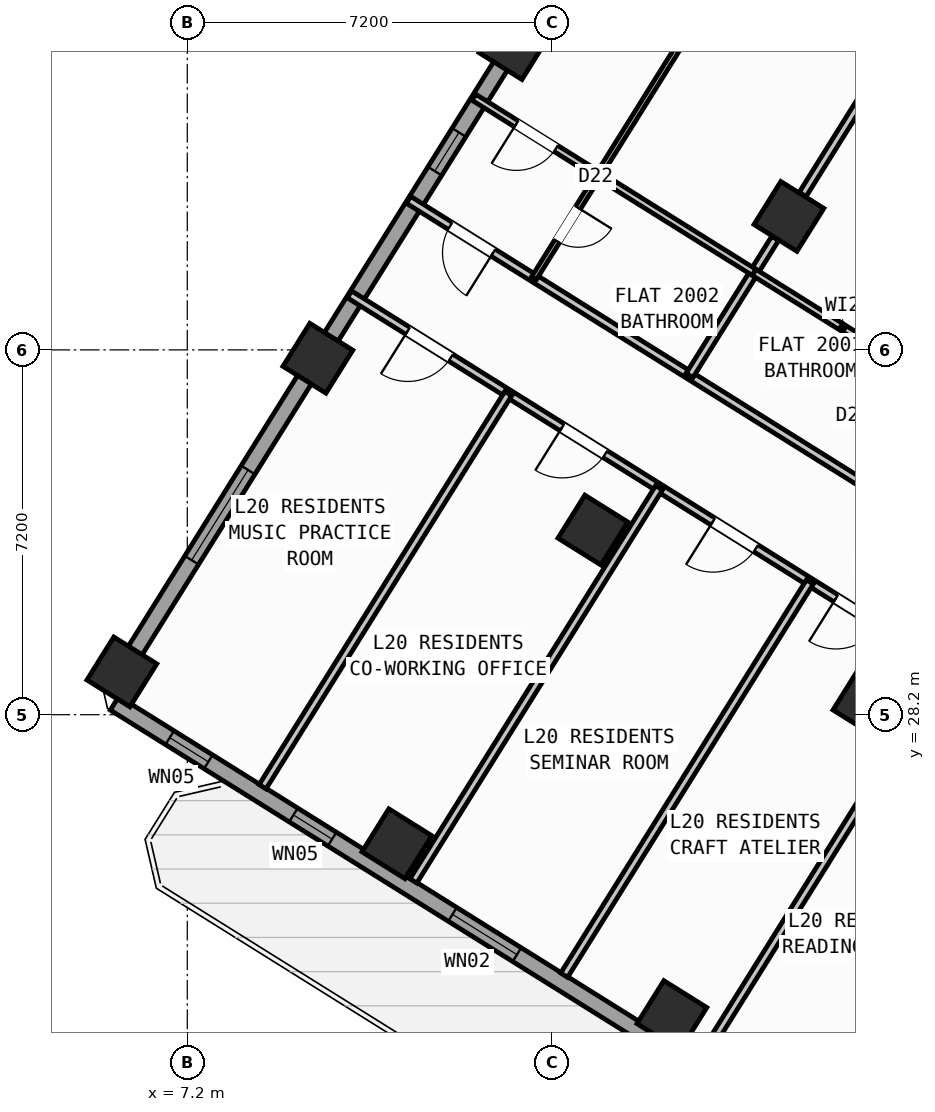
"""IFC4 building model, lengths in metres.
Left out: names, types, materials, properties, quantities, classifications, styles, units other than length and angle.
Written with IfcOpenShell. Run it as: python <this file> out.ifc"""

import sys

from ifc_helpers import new_model, si_unit, direction, frame, frame_2d, origin, origin_2d, place, context, subcontext, project, spatial, rectangle, hollow_rectangle, extrude, source, transform, mapped, element, fill, save


model = new_model("IFC4")
c1 = context("Model", 3, precision=1e-05, world=origin(), true_north=direction((0.0, 1.0)))
c2 = subcontext(c1, "Body", "Model", "MODEL_VIEW")
j1 = project(units=[si_unit("LENGTHUNIT", "METRE"), si_unit("PLANEANGLEUNIT", "RADIAN")], contexts=[c1])
p1 = place(None, origin())
s1 = spatial("IfcSite", under=j1, at=p1, CompositionType="ELEMENT")
p2 = place(p1, origin())
s2 = spatial("IfcBuilding", under=s1, at=p2, CompositionType="ELEMENT")
p3 = place(p2, frame((0.0, 0.0, 81.0)))
s3 = spatial("IfcBuildingStorey", under=s2, at=p3, CompositionType="ELEMENT", Elevation=81.0)
m1 = source(origin(), c2, "Body", "SweptSolid", [
    extrude(hollow_rectangle(XDim=1.0, YDim=1.0, WallThickness=0.04, at=origin_2d()), origin(), (0.0, 0.0, 1.0), 3.6),
])
for number, where, z_axis, x_axis in (
    (1, (20.632, 28.452, 0.0), (0.0, 0.0, 1.0), (-0.848, 0.53, 0.0)),
    (2, (16.764, 22.261, 0.0), (0.0, 0.0, 1.0), (-0.848, 0.53, 0.0)),
    (3, (19.073, 38.034, 0.0), (0.0, 0.0, 1.0), (-0.848, 0.53, 0.0)),
    (4, (15.205, 31.844, 0.0), (0.0, 0.0, 1.0), (-0.848, 0.53, 0.0)),
    (5, (11.336, 25.653, 0.0), (0.0, 0.0, 1.0), (-0.848, 0.53, 0.0)),
    (6, (13.646, 41.426, 0.0), (0.0, 0.0, 1.0), (-0.848, 0.53, 0.0)),
    (7, (9.777, 35.235, 0.0), (0.0, 0.0, 1.0), (-0.848, 0.53, 0.0)),
    (8, (5.909, 29.044, 0.0), (0.0, 0.0, 1.0), (-0.848, 0.53, 0.0)),
):
    element("IfcColumn", number, at=place(p3, frame(where, z_axis=z_axis, x_axis=x_axis)), inside=s3, PredefinedType="COLUMN", context=c2, shape_type="MappedRepresentation", body=[
        mapped(m1, transform((0.0, 0.0, 0.0), scale=1.0)),
    ])
p4 = place(p3, frame((31.76, 12.183, 0.0), z_axis=(0.0, 0.0, 1.0), x_axis=(-0.848047074256, 0.529920899612, 0.0)))
e9 = element("IfcWall", 9, at=p4, inside=s3, PredefinedType="STANDARD", context=c2, shape_type="SweptSolid", body=[
    extrude(rectangle(XDim=30.652, YDim=0.32, at=frame_2d((15.326, 0.0))), origin(), (0.0, 0.0, 1.0), 3.32),
])
p5 = place(p4, frame((14.878, 0.0, 0.0)))
e10 = element("IfcOpeningElement", 10, at=p5, cuts=e9, PredefinedType="OPENING", context=c2, shape_type="SweptSolid", body=[
    extrude(rectangle(XDim=1.2, YDim=2.15, at=frame_2d((0.6, 1.075))), frame((0.0, 0.17, 0.0), z_axis=(0.0, -1.0, 0.0), x_axis=(1.0, 0.0, 0.0)), (0.0, 0.0, 1.0), 0.34),
])
p6 = place(p4, frame((1.99, 0.0, 0.8)))
e11 = element("IfcOpeningElement", 11, at=p6, cuts=e9, PredefinedType="OPENING", context=c2, shape_type="SweptSolid", body=[
    extrude(rectangle(XDim=2.1, YDim=1.55, at=frame_2d((1.05, 0.775))), frame((0.0, 0.17, 0.0), z_axis=(0.0, -1.0, 0.0), x_axis=(1.0, 0.0, 0.0)), (0.0, 0.0, 1.0), 0.34),
])
p7 = place(p4, frame((7.169, 0.0, 0.8)))
e12 = element("IfcOpeningElement", 12, at=p7, cuts=e9, PredefinedType="OPENING", context=c2, shape_type="SweptSolid", body=[
    extrude(rectangle(XDim=2.1, YDim=1.55, at=frame_2d((1.05, 0.775))), frame((0.0, 0.17, 0.0), z_axis=(0.0, -1.0, 0.0), x_axis=(1.0, 0.0, 0.0)), (0.0, 0.0, 1.0), 0.34),
])
p8 = place(p4, frame((21.289, 0.0, 0.85)))
e13 = element("IfcOpeningElement", 13, at=p8, cuts=e9, PredefinedType="OPENING", context=c2, shape_type="SweptSolid", body=[
    extrude(rectangle(XDim=1.5, YDim=1.5, at=frame_2d((0.75, 0.75))), frame((0.0, 0.17, 0.0), z_axis=(0.0, -1.0, 0.0), x_axis=(1.0, 0.0, 0.0)), (0.0, 0.0, 1.0), 0.34),
])
p9 = place(p4, frame((25.59, 0.0, 1.0)))
e14 = element("IfcOpeningElement", 14, at=p9, cuts=e9, PredefinedType="OPENING", context=c2, shape_type="SweptSolid", body=[
    extrude(rectangle(XDim=0.9, YDim=1.25, at=frame_2d((0.45, 0.625))), frame((0.0, 0.17, 0.0), z_axis=(0.0, -1.0, 0.0), x_axis=(1.0, 0.0, 0.0)), (0.0, 0.0, 1.0), 0.34),
])
p10 = place(p4, frame((28.47, 0.0, 1.0)))
e15 = element("IfcOpeningElement", 15, at=p10, cuts=e9, PredefinedType="OPENING", context=c2, shape_type="SweptSolid", body=[
    extrude(rectangle(XDim=0.9, YDim=1.25, at=frame_2d((0.45, 0.625))), frame((0.0, 0.17, 0.0), z_axis=(0.0, -1.0, 0.0), x_axis=(1.0, 0.0, 0.0)), (0.0, 0.0, 1.0), 0.34),
])
p11 = place(p3, frame((5.7, 28.71, 0.0), z_axis=(0.0, 0.0, 1.0), x_axis=(0.529923711467, 0.8480453172, 0.0)))
e16 = element("IfcWall", 16, at=p11, inside=s3, PredefinedType="STANDARD", context=c2, shape_type="SweptSolid", body=[
    extrude(rectangle(XDim=21.587, YDim=0.32, at=frame_2d((10.794, 0.0))), origin(), (0.0, 0.0, 1.0), 2.745),
])
p12 = place(p11, frame((2.994, 0.0, 0.8)))
e17 = element("IfcOpeningElement", 17, at=p12, cuts=e16, PredefinedType="OPENING", context=c2, shape_type="SweptSolid", body=[
    extrude(rectangle(XDim=2.1, YDim=1.55, at=frame_2d((1.05, 0.775))), frame((0.0, 0.17, 0.0), z_axis=(0.0, -1.0, 0.0), x_axis=(1.0, 0.0, 0.0)), (0.0, 0.0, 1.0), 0.34),
])
p13 = place(p11, frame((12.049, 0.0, 1.0)))
e18 = element("IfcOpeningElement", 18, at=p13, cuts=e16, PredefinedType="OPENING", context=c2, shape_type="SweptSolid", body=[
    extrude(rectangle(XDim=0.9, YDim=1.25, at=frame_2d((0.45, 0.625))), frame((0.0, 0.17, 0.0), z_axis=(0.0, -1.0, 0.0), x_axis=(1.0, 0.0, 0.0)), (0.0, 0.0, 1.0), 0.34),
])
p14 = place(p11, frame((17.431, 0.0, 0.85)))
e19 = element("IfcOpeningElement", 19, at=p14, cuts=e16, PredefinedType="OPENING", context=c2, shape_type="SweptSolid", body=[
    extrude(rectangle(XDim=1.5, YDim=1.5, at=frame_2d((0.75, 0.75))), frame((0.0, 0.17, 0.0), z_axis=(0.0, -1.0, 0.0), x_axis=(1.0, 0.0, 0.0)), (0.0, 0.0, 1.0), 0.34),
])
p15 = place(p3, frame((17.424, 47.083, 0.0), z_axis=(0.0, 0.0, 1.0), x_axis=(0.848049927979, -0.529916332693, 0.0)))
e20 = element("IfcWall", 20, at=p15, inside=s3, PredefinedType="STANDARD", context=c2, shape_type="SweptSolid", body=[
    extrude(rectangle(XDim=29.223, YDim=0.32, at=frame_2d((14.612, 0.0))), origin(), (0.0, 0.0, 1.0), 3.32),
])
p16 = place(p15, frame((3.709, 0.0, 0.0)))
e21 = element("IfcOpeningElement", 21, at=p16, cuts=e20, PredefinedType="OPENING", context=c2, shape_type="SweptSolid", body=[
    extrude(rectangle(XDim=1.05, YDim=2.15, at=frame_2d((0.525, 1.075))), frame((0.0, 0.17, 0.0), z_axis=(0.0, -1.0, 0.0), x_axis=(1.0, 0.0, 0.0)), (0.0, 0.0, 1.0), 0.34),
])
p17 = place(p15, frame((0.659, 0.0, 0.95)))
e22 = element("IfcOpeningElement", 22, at=p17, cuts=e20, PredefinedType="OPENING", context=c2, shape_type="SweptSolid", body=[
    extrude(rectangle(XDim=1.2, YDim=1.4, at=frame_2d((0.6, 0.7))), frame((0.0, 0.17, 0.0), z_axis=(0.0, -1.0, 0.0), x_axis=(1.0, 0.0, 0.0)), (0.0, 0.0, 1.0), 0.34),
])
p18 = place(p15, frame((7.369, 0.0, 0.85)))
e23 = element("IfcOpeningElement", 23, at=p18, cuts=e20, PredefinedType="OPENING", context=c2, shape_type="SweptSolid", body=[
    extrude(rectangle(XDim=1.8, YDim=1.5, at=frame_2d((0.9, 0.75))), frame((0.0, 0.17, 0.0), z_axis=(0.0, -1.0, 0.0), x_axis=(1.0, 0.0, 0.0)), (0.0, 0.0, 1.0), 0.34),
])
p19 = place(p15, frame((11.009, 0.0, 1.0)))
e24 = element("IfcOpeningElement", 24, at=p19, cuts=e20, PredefinedType="OPENING", context=c2, shape_type="SweptSolid", body=[
    extrude(rectangle(XDim=0.9, YDim=1.25, at=frame_2d((0.45, 0.625))), frame((0.0, 0.17, 0.0), z_axis=(0.0, -1.0, 0.0), x_axis=(1.0, 0.0, 0.0)), (0.0, 0.0, 1.0), 0.34),
])
p20 = place(p15, frame((13.874, 0.0, 0.95)))
e25 = element("IfcOpeningElement", 25, at=p20, cuts=e20, PredefinedType="OPENING", context=c2, shape_type="SweptSolid", body=[
    extrude(rectangle(XDim=1.2, YDim=1.4, at=frame_2d((0.6, 0.7))), frame((0.0, 0.17, 0.0), z_axis=(0.0, -1.0, 0.0), x_axis=(1.0, 0.0, 0.0)), (0.0, 0.0, 1.0), 0.34),
])
p21 = place(p15, frame((17.254, 0.0, 1.0)))
e26 = element("IfcOpeningElement", 26, at=p21, cuts=e20, PredefinedType="OPENING", context=c2, shape_type="SweptSolid", body=[
    extrude(rectangle(XDim=0.9, YDim=1.25, at=frame_2d((0.45, 0.625))), frame((0.0, 0.17, 0.0), z_axis=(0.0, -1.0, 0.0), x_axis=(1.0, 0.0, 0.0)), (0.0, 0.0, 1.0), 0.34),
])
p22 = place(p15, frame((20.764, 0.0, 0.8)))
e27 = element("IfcOpeningElement", 27, at=p22, cuts=e20, PredefinedType="OPENING", context=c2, shape_type="SweptSolid", body=[
    extrude(rectangle(XDim=2.1, YDim=1.55, at=frame_2d((1.05, 0.775))), frame((0.0, 0.17, 0.0), z_axis=(0.0, -1.0, 0.0), x_axis=(1.0, 0.0, 0.0)), (0.0, 0.0, 1.0), 0.34),
])
p23 = place(p15, frame((25.403, 0.0, 0.8)))
e28 = element("IfcOpeningElement", 28, at=p23, cuts=e20, PredefinedType="OPENING", context=c2, shape_type="SweptSolid", body=[
    extrude(rectangle(XDim=2.1, YDim=1.55, at=frame_2d((1.05, 0.775))), frame((0.0, 0.17, 0.0), z_axis=(0.0, -1.0, 0.0), x_axis=(1.0, 0.0, 0.0)), (0.0, 0.0, 1.0), 0.34),
])
p24 = place(p3, frame((24.588, 27.631, 0.0), z_axis=(0.0, 0.0, 1.0), x_axis=(-0.529914992377, -0.848050765494, 0.0)))
e29 = element("IfcWall", 29, at=p24, inside=s3, PredefinedType="PARTITIONING", context=c2, shape_type="SweptSolid", body=[
    extrude(rectangle(XDim=9.15, YDim=0.16, at=frame_2d((4.575, 0.0))), origin(), (0.0, 0.0, 1.0), 3.31),
])
p25 = place(p3, frame((25.754, 29.497, 0.0), z_axis=(0.0, 0.0, 1.0), x_axis=(-0.848045850158, 0.529922858565, 0.0)))
e30 = element("IfcWall", 30, at=p25, inside=s3, PredefinedType="PARTITIONING", context=c2, shape_type="SweptSolid", body=[
    extrude(rectangle(XDim=16.73, YDim=0.16, at=frame_2d((8.365, 0.0))), origin(), (0.0, 0.0, 1.0), 3.31),
])
p26 = place(p25, frame((2.532, 0.0, 0.0)))
e31 = element("IfcOpeningElement", 31, at=p26, cuts=e30, PredefinedType="OPENING", context=c2, shape_type="SweptSolid", body=[
    extrude(rectangle(XDim=1.0, YDim=2.1, at=frame_2d((0.5, 1.05))), frame((0.0, 0.09, 0.0), z_axis=(0.0, -1.0, 0.0), x_axis=(1.0, 0.0, 0.0)), (0.0, 0.0, 1.0), 0.18),
])
p27 = place(p25, frame((14.76, 0.0, 0.0)))
e32 = element("IfcOpeningElement", 32, at=p27, cuts=e30, PredefinedType="OPENING", context=c2, shape_type="SweptSolid", body=[
    extrude(rectangle(XDim=1.0, YDim=2.1, at=frame_2d((0.5, 1.05))), frame((0.0, 0.09, 0.0), z_axis=(0.0, -1.0, 0.0), x_axis=(1.0, 0.0, 0.0)), (0.0, 0.0, 1.0), 0.18),
])
p28 = place(p3, frame((24.588, 27.631, 0.0), z_axis=(0.0, 0.0, 1.0), x_axis=(-0.848041752158, 0.529929416617, 0.0)))
e33 = element("IfcWall", 33, at=p28, inside=s3, PredefinedType="PARTITIONING", context=c2, shape_type="SweptSolid", body=[
    extrude(rectangle(XDim=16.73, YDim=0.16, at=frame_2d((8.365, 0.0))), origin(), (0.0, 0.0, 1.0), 3.31),
])
p29 = place(p28, frame((0.92, 0.0, 0.0)))
e34 = element("IfcOpeningElement", 34, at=p29, cuts=e33, PredefinedType="OPENING", context=c2, shape_type="SweptSolid", body=[
    extrude(rectangle(XDim=1.0, YDim=2.1, at=frame_2d((0.5, 1.05))), frame((0.0, 0.09, 0.0), z_axis=(0.0, -1.0, 0.0), x_axis=(1.0, 0.0, 0.0)), (0.0, 0.0, 1.0), 0.18),
])
p30 = place(p28, frame((4.408, 0.0, 0.0)))
e35 = element("IfcOpeningElement", 35, at=p30, cuts=e33, PredefinedType="OPENING", context=c2, shape_type="SweptSolid", body=[
    extrude(rectangle(XDim=1.0, YDim=2.1, at=frame_2d((0.5, 1.05))), frame((0.0, 0.09, 0.0), z_axis=(0.0, -1.0, 0.0), x_axis=(1.0, 0.0, 0.0)), (0.0, 0.0, 1.0), 0.18),
])
p31 = place(p28, frame((7.271, 0.0, 0.0)))
e36 = element("IfcOpeningElement", 36, at=p31, cuts=e33, PredefinedType="OPENING", context=c2, shape_type="SweptSolid", body=[
    extrude(rectangle(XDim=1.0, YDim=2.1, at=frame_2d((0.5, 1.05))), frame((0.0, 0.09, 0.0), z_axis=(0.0, -1.0, 0.0), x_axis=(1.0, 0.0, 0.0)), (0.0, 0.0, 1.0), 0.18),
])
p32 = place(p28, frame((10.78, 0.0, 0.0)))
e37 = element("IfcOpeningElement", 37, at=p32, cuts=e33, PredefinedType="OPENING", context=c2, shape_type="SweptSolid", body=[
    extrude(rectangle(XDim=1.0, YDim=2.1, at=frame_2d((0.5, 1.05))), frame((0.0, 0.09, 0.0), z_axis=(0.0, -1.0, 0.0), x_axis=(1.0, 0.0, 0.0)), (0.0, 0.0, 1.0), 0.18),
])
p33 = place(p28, frame((14.372, 0.0, 0.0)))
e38 = element("IfcOpeningElement", 38, at=p33, cuts=e33, PredefinedType="OPENING", context=c2, shape_type="SweptSolid", body=[
    extrude(rectangle(XDim=1.0, YDim=2.1, at=frame_2d((0.5, 1.05))), frame((0.0, 0.09, 0.0), z_axis=(0.0, -1.0, 0.0), x_axis=(1.0, 0.0, 0.0)), (0.0, 0.0, 1.0), 0.18),
])
p34 = place(p3, frame((22.179, 29.136, 0.0), z_axis=(0.0, 0.0, 1.0), x_axis=(-0.529922190913, -0.848046267357, 0.0)))
e39 = element("IfcWall", 39, at=p34, inside=s3, PredefinedType="PARTITIONING", context=c2, shape_type="SweptSolid", body=[
    extrude(rectangle(XDim=9.15, YDim=0.16, at=frame_2d((4.575, 0.0))), origin(), (0.0, 0.0, 1.0), 3.31),
])
p35 = place(p3, frame((19.486, 30.819, 0.0), z_axis=(0.0, 0.0, 1.0), x_axis=(-0.529914992377, -0.848050765494, 0.0)))
e40 = element("IfcWall", 40, at=p35, inside=s3, PredefinedType="PARTITIONING", context=c2, shape_type="SweptSolid", body=[
    extrude(rectangle(XDim=9.15, YDim=0.16, at=frame_2d((4.575, 0.0))), origin(), (0.0, 0.0, 1.0), 2.935),
])
p36 = place(p3, frame((16.51, 32.678, 0.0), z_axis=(0.0, 0.0, 1.0), x_axis=(-0.529903001606, -0.848058257957, 0.0)))
e41 = element("IfcWall", 41, at=p36, inside=s3, PredefinedType="PARTITIONING", context=c2, shape_type="SweptSolid", body=[
    extrude(rectangle(XDim=9.15, YDim=0.16, at=frame_2d((4.575, 0.0))), origin(), (0.0, 0.0, 1.0), 3.31),
])
p37 = place(p3, frame((13.535, 34.538, 0.0), z_axis=(0.0, 0.0, 1.0), x_axis=(-0.529934181779, -0.848038774457, 0.0)))
e42 = element("IfcWall", 42, at=p37, inside=s3, PredefinedType="PARTITIONING", context=c2, shape_type="SweptSolid", body=[
    extrude(rectangle(XDim=9.15, YDim=0.16, at=frame_2d((4.575, 0.0))), origin(), (0.0, 0.0, 1.0), 3.31),
])
p38 = place(p3, frame((22.18, 43.006, 0.0), z_axis=(0.0, 0.0, 1.0), x_axis=(-0.529937421401, -0.848036750028, 0.0)))
e43 = element("IfcWall", 43, at=p38, inside=s3, PredefinedType="PARTITIONING", context=c2, shape_type="SweptSolid", body=[
    extrude(rectangle(XDim=5.351, YDim=0.16, at=frame_2d((2.676, 0.0))), origin(), (0.0, 0.0, 1.0), 2.745),
])
p39 = place(p3, frame((18.802, 37.6, 0.0), z_axis=(0.0, 0.0, 1.0), x_axis=(-0.529875025416, -0.848075738033, 0.0)))
e44 = element("IfcWall", 44, at=p39, inside=s3, PredefinedType="PARTITIONING", context=c2, shape_type="SweptSolid", body=[
    extrude(rectangle(XDim=3.188, YDim=0.16, at=frame_2d((1.594, 0.0))), origin(), (0.0, 0.0, 1.0), 2.745),
])
p40 = place(p3, frame((21.882, 34.746, 0.0), z_axis=(0.0, 0.0, 1.0), x_axis=(-0.848041525148, 0.529929779899, 0.0)))
e45 = element("IfcWall", 45, at=p40, inside=s3, PredefinedType="PLUMBINGWALL", context=c2, shape_type="SweptSolid", body=[
    extrude(rectangle(XDim=4.125, YDim=0.14, at=frame_2d((2.062, 0.0))), origin(), (0.0, 0.0, 1.0), 3.31),
])
p41 = place(p3, frame((19.67, 45.821, 0.0), z_axis=(0.0, 0.0, 1.0), x_axis=(-0.529922479612, -0.848046086956, 0.0)))
e46 = element("IfcWall", 46, at=p41, inside=s3, PredefinedType="PARTITIONING", context=c2, shape_type="SweptSolid", body=[
    extrude(rectangle(XDim=10.62, YDim=0.11, at=frame_2d((5.31, 0.0))), origin(), (0.0, 0.0, 1.0), 3.31),
])
p42 = place(p41, frame((8.98, 0.0, 0.0)))
e47 = element("IfcOpeningElement", 47, at=p42, cuts=e46, PredefinedType="OPENING", context=c2, shape_type="SweptSolid", body=[
    extrude(rectangle(XDim=0.78, YDim=2.05, at=frame_2d((0.39, 1.025))), frame((0.0, 0.065, 0.0), z_axis=(0.0, -1.0, 0.0), x_axis=(1.0, 0.0, 0.0)), (0.0, 0.0, 1.0), 0.13),
])
p43 = place(p41, frame((3.65, 0.0, 0.0)))
e48 = element("IfcOpeningElement", 48, at=p43, cuts=e46, PredefinedType="OPENING", context=c2, shape_type="SweptSolid", body=[
    extrude(rectangle(XDim=0.92, YDim=2.08, at=frame_2d((0.46, 1.04))), frame((0.0, 0.065, 0.0), z_axis=(0.0, -1.0, 0.0), x_axis=(1.0, 0.0, 0.0)), (0.0, 0.0, 1.0), 0.13),
])
p44 = place(p3, frame((15.314, 38.85, 0.0), z_axis=(0.0, 0.0, 1.0), x_axis=(-0.848045593671, 0.529923269025, 0.0)))
e49 = element("IfcWall", 49, at=p44, inside=s3, PredefinedType="PLUMBINGWALL", context=c2, shape_type="SweptSolid", body=[
    extrude(rectangle(XDim=2.9, YDim=0.14, at=frame_2d((1.45, 0.0))), origin(), (0.0, 0.0, 1.0), 3.31),
])
p45 = place(p44, frame((0.99, 0.0, 0.0)))
e50 = element("IfcOpeningElement", 50, at=p45, cuts=e49, PredefinedType="OPENING", context=c2, shape_type="SweptSolid", body=[
    extrude(rectangle(XDim=0.92, YDim=2.08, at=frame_2d((0.46, 1.04))), frame((0.0, 0.08, 0.0), z_axis=(0.0, -1.0, 0.0), x_axis=(1.0, 0.0, 0.0)), (0.0, 0.0, 1.0), 0.16),
])
p46 = place(p3, frame((18.384, 36.932, 0.0), z_axis=(0.0, 0.0, 1.0), x_axis=(-0.848051346257, 0.52991406295, 0.0)))
e51 = element("IfcWall", 51, at=p46, inside=s3, PredefinedType="PLUMBINGWALL", context=c2, shape_type="SweptSolid", body=[
    extrude(rectangle(XDim=3.62, YDim=0.14, at=frame_2d((1.81, 0.0))), origin(), (0.0, 0.0, 1.0), 3.31),
])
m2 = source(origin(), c2, "Body", "SweptSolid", [
    extrude(rectangle(XDim=1.5, YDim=1.5, at=frame_2d((0.75, 0.75))), frame((0.0, 0.03, 0.0), z_axis=(0.0, -1.0, 0.0), x_axis=(1.0, 0.0, 0.0)), (0.0, 0.0, 1.0), 0.06),
])
p47 = place(p8, origin())
e52 = element("IfcWindow", 52, at=p47, inside=s3, PartitioningType="SINGLE_PANEL", PredefinedType="WINDOW", context=c2, shape_type="MappedRepresentation", body=[
    mapped(m2, transform((0.0, 0.0, 0.0), scale=1.0)),
])
fill(e13, e52)
m3 = source(origin(), c2, "Body", "SweptSolid", [
    extrude(rectangle(XDim=0.9, YDim=1.25, at=frame_2d((0.45, 0.625))), frame((0.0, 0.03, 0.0), z_axis=(0.0, -1.0, 0.0), x_axis=(1.0, 0.0, 0.0)), (0.0, 0.0, 1.0), 0.06),
])
p48 = place(p9, origin())
e53 = element("IfcWindow", 53, at=p48, inside=s3, PartitioningType="SINGLE_PANEL", PredefinedType="WINDOW", context=c2, shape_type="MappedRepresentation", body=[
    mapped(m3, transform((0.0, 0.0, 0.0), scale=1.0)),
])
fill(e14, e53)
p49 = place(p10, origin())
e54 = element("IfcWindow", 54, at=p49, inside=s3, PartitioningType="SINGLE_PANEL", PredefinedType="WINDOW", context=c2, shape_type="MappedRepresentation", body=[
    mapped(m3, transform((0.0, 0.0, 0.0), scale=1.0)),
])
fill(e15, e54)
m4 = source(origin(), c2, "Body", "SweptSolid", [
    extrude(rectangle(XDim=2.1, YDim=1.55, at=frame_2d((1.05, 0.775))), frame((0.0, 0.03, 0.0), z_axis=(0.0, -1.0, 0.0), x_axis=(1.0, 0.0, 0.0)), (0.0, 0.0, 1.0), 0.06),
])
p50 = place(p12, origin())
e55 = element("IfcWindow", 55, at=p50, inside=s3, PartitioningType="SINGLE_PANEL", PredefinedType="WINDOW", context=c2, shape_type="MappedRepresentation", body=[
    mapped(m4, transform((0.0, 0.0, 0.0), scale=1.0)),
])
fill(e17, e55)
p51 = place(p13, origin())
e56 = element("IfcWindow", 56, at=p51, inside=s3, PartitioningType="SINGLE_PANEL", PredefinedType="WINDOW", context=c2, shape_type="MappedRepresentation", body=[
    mapped(m3, transform((0.0, 0.0, 0.0), scale=1.0)),
])
fill(e18, e56)
m5 = source(origin(), c2, "Body", "SweptSolid", [
    extrude(rectangle(XDim=1.0, YDim=2.1, at=frame_2d((0.5, 1.05))), frame((0.0, 0.025, 0.0), z_axis=(0.0, -1.0, 0.0), x_axis=(1.0, 0.0, 0.0)), (0.0, 0.0, 1.0), 0.05),
])
p52 = place(p30, origin())
e57 = element("IfcDoor", 57, at=p52, inside=s3, OperationType="SINGLE_SWING_RIGHT", PredefinedType="DOOR", context=c2, shape_type="MappedRepresentation", body=[
    mapped(m5, transform((0.0, 0.0, 0.0), scale=1.0)),
])
fill(e35, e57)
p53 = place(p31, origin())
e58 = element("IfcDoor", 58, at=p53, inside=s3, OperationType="SINGLE_SWING_RIGHT", PredefinedType="DOOR", context=c2, shape_type="MappedRepresentation", body=[
    mapped(m5, transform((0.0, 0.0, 0.0), scale=1.0)),
])
fill(e36, e58)
p54 = place(p32, origin())
e59 = element("IfcDoor", 59, at=p54, inside=s3, OperationType="SINGLE_SWING_RIGHT", PredefinedType="DOOR", context=c2, shape_type="MappedRepresentation", body=[
    mapped(m5, transform((0.0, 0.0, 0.0), scale=1.0)),
])
fill(e37, e59)
p55 = place(p33, origin())
e60 = element("IfcDoor", 60, at=p55, inside=s3, OperationType="SINGLE_SWING_RIGHT", PredefinedType="DOOR", context=c2, shape_type="MappedRepresentation", body=[
    mapped(m5, transform((0.0, 0.0, 0.0), scale=1.0)),
])
fill(e38, e60)
p56 = place(p27, origin())
e61 = element("IfcDoor", 61, at=p56, inside=s3, OperationType="SINGLE_SWING_LEFT", PredefinedType="DOOR", context=c2, shape_type="MappedRepresentation", body=[
    mapped(m5, transform((0.0, 0.0, 0.0), scale=1.0)),
])
fill(e32, e61)
m6 = source(origin(), c2, "Body", "SweptSolid", [
    extrude(rectangle(XDim=0.92, YDim=2.08, at=frame_2d((0.46, 1.04))), frame((0.0, 0.025, 0.0), z_axis=(0.0, -1.0, 0.0), x_axis=(1.0, 0.0, 0.0)), (0.0, 0.0, 1.0), 0.05),
])
p57 = place(p45, origin())
e62 = element("IfcDoor", 62, at=p57, inside=s3, OperationType="SINGLE_SWING_RIGHT", PredefinedType="DOOR", context=c2, shape_type="MappedRepresentation", body=[
    mapped(m6, transform((0.0, 0.0, 0.0), scale=1.0)),
])
fill(e50, e62)
m7 = source(origin(), c2, "Body", "SweptSolid", [
    extrude(rectangle(XDim=0.78, YDim=2.05, at=frame_2d((0.39, 1.025))), frame((0.0, 0.025, 0.0), z_axis=(0.0, -1.0, 0.0), x_axis=(1.0, 0.0, 0.0)), (0.0, 0.0, 1.0), 0.05),
])
p58 = place(p42, origin())
e63 = element("IfcDoor", 63, at=p58, inside=s3, OperationType="SINGLE_SWING_LEFT", PredefinedType="DOOR", context=c2, shape_type="MappedRepresentation", body=[
    mapped(m7, transform((0.0, 0.0, 0.0), scale=1.0)),
])
fill(e47, e63)
save(model, sys.argv[1])
